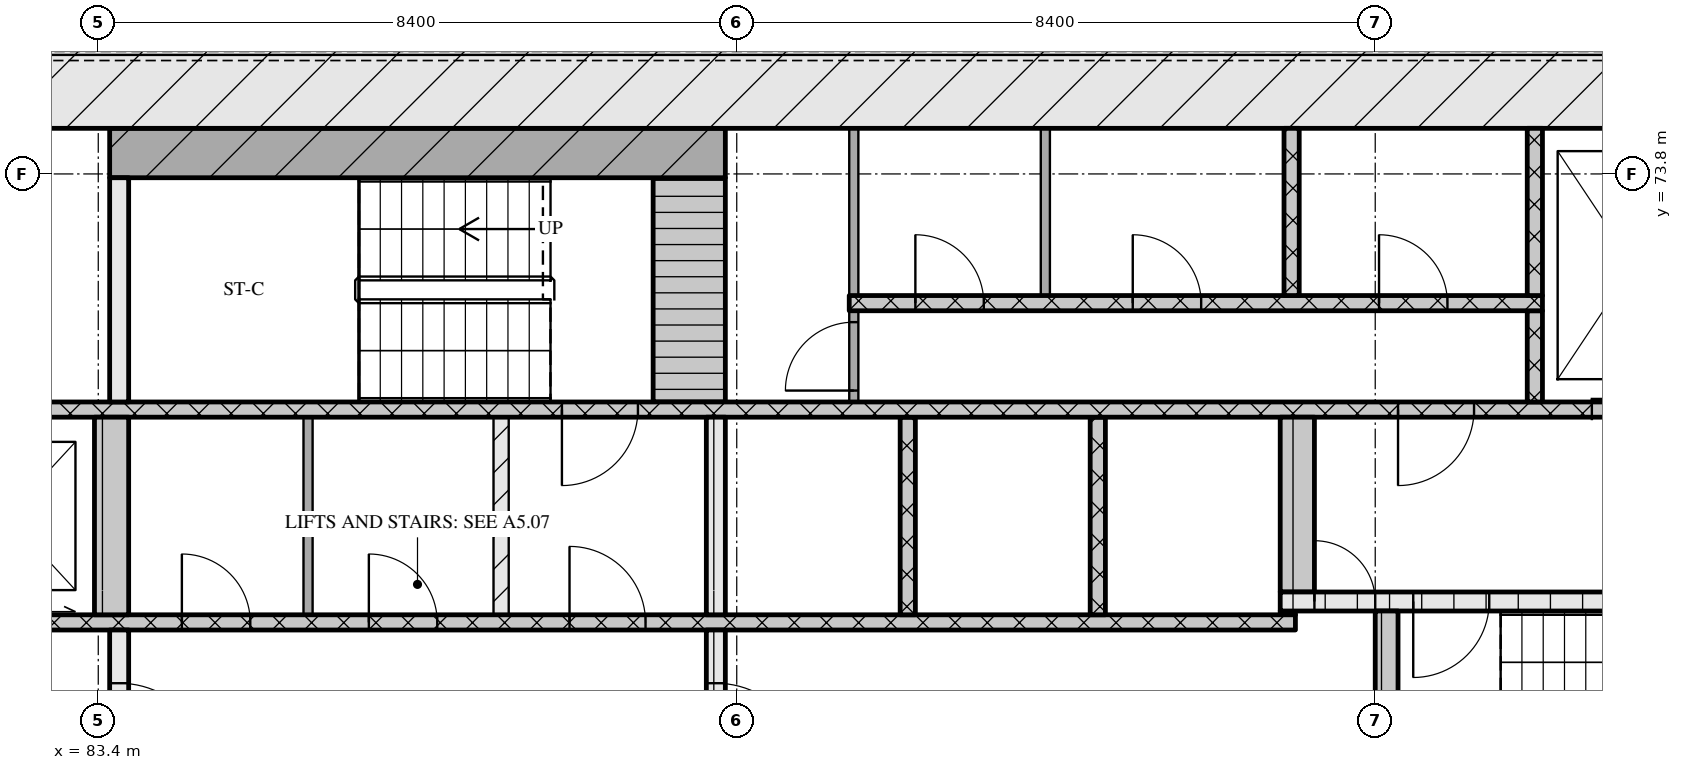
"""IFC4 building model, lengths in metres.
Left out: names, types, materials, properties, quantities, classifications, styles, units other than length and angle.
Written with IfcOpenShell. Run it as: python <this file> out.ifc"""

import sys

from ifc_helpers import new_model, si_unit, direction, frame, frame_2d, origin, place, context, subcontext, project, spatial, rectangle, extrude, element, fill, save


model = new_model("IFC4")
c1 = context("Model", 3, precision=1e-05, world=origin(), true_north=direction((0.0, 1.0)))
c2 = subcontext(c1, "Body", "Model", "MODEL_VIEW")
j1 = project(units=[si_unit("LENGTHUNIT", "METRE"), si_unit("PLANEANGLEUNIT", "RADIAN")], contexts=[c1])
p1 = place(None, origin())
s1 = spatial("IfcSite", under=j1, at=p1, CompositionType="ELEMENT")
p2 = place(p1, origin())
s2 = spatial("IfcBuilding", under=s1, at=p2, CompositionType="ELEMENT")
p3 = place(p2, frame((0.0, 0.0, 44.4)))
s3 = spatial("IfcBuildingStorey", under=s2, at=p3, CompositionType="ELEMENT", Elevation=44.4)
p4 = place(p3, frame((66.6, 75.0, 0.0), z_axis=(0.0, 0.0, 1.0), x_axis=(1.0, 0.0, 0.0)))
e1 = element("IfcWall", 1, at=p4, inside=s3, PredefinedType="SOLIDWALL", context=c2, shape_type="SweptSolid", body=[
    extrude(rectangle(XDim=42.0, YDim=1.2, at=frame_2d((21.0, 0.0))), origin(), (0.0, 0.0, 1.0), 3.32),
])
p5 = place(p3, frame((83.675, 65.2, 0.0), z_axis=(0.0, 0.0, 1.0), x_axis=(0.0, 1.0, 0.0)))
e2 = element("IfcWall", 2, at=p5, inside=s3, PredefinedType="SOLIDWALL", context=c2, shape_type="SweptSolid", body=[
    extrude(rectangle(XDim=2.6, YDim=0.25, at=frame_2d((1.3, 0.0))), origin(), (0.0, 0.0, 1.0), 3.32),
])
p6 = place(p5, frame((0.7, 0.0, 0.0)))
e3 = element("IfcOpeningElement", 3, at=p6, cuts=e2, PredefinedType="OPENING", context=c2, shape_type="SweptSolid", body=[
    extrude(rectangle(XDim=1.2, YDim=2.1, at=frame_2d((0.6, 1.05))), frame((0.0, 0.135, 0.0), z_axis=(0.0, -1.0, 0.0), x_axis=(1.0, 0.0, 0.0)), (0.0, 0.0, 1.0), 0.27),
])
p7 = place(p3, frame((91.525, 65.2, 0.0), z_axis=(0.0, 0.0, 1.0), x_axis=(0.0, 1.0, 0.0)))
e4 = element("IfcWall", 4, at=p7, inside=s3, PredefinedType="SOLIDWALL", context=c2, shape_type="SweptSolid", body=[
    extrude(rectangle(XDim=2.6, YDim=0.25, at=frame_2d((1.3, 0.0))), origin(), (0.0, 0.0, 1.0), 3.32),
])
p8 = place(p7, frame((0.7, 0.0, 0.0)))
e5 = element("IfcOpeningElement", 5, at=p8, cuts=e4, PredefinedType="OPENING", context=c2, shape_type="SweptSolid", body=[
    extrude(rectangle(XDim=1.2, YDim=2.1, at=frame_2d((0.6, 1.05))), frame((0.0, 0.135, 0.0), z_axis=(0.0, -1.0, 0.0), x_axis=(1.0, 0.0, 0.0)), (0.0, 0.0, 1.0), 0.27),
])
p9 = place(p3, frame((100.35, 65.2, 0.0), z_axis=(0.0, 0.0, 1.0), x_axis=(0.0, 1.0, 0.0)))
e6 = element("IfcWall", 6, at=p9, inside=s3, PredefinedType="SOLIDWALL", context=c2, shape_type="SweptSolid", body=[
    extrude(rectangle(XDim=2.85, YDim=0.3, at=frame_2d((1.425, 0.0))), origin(), (0.0, 0.0, 1.0), 3.32),
])
p10 = place(p3, frame((76.05, 67.9, 0.0), z_axis=(0.0, 0.0, 1.0), x_axis=(1.0, 0.0, 0.0)))
e7 = element("IfcWall", 7, at=p10, inside=s3, PredefinedType="SOLIDWALL", context=c2, shape_type="SweptSolid", body=[
    extrude(rectangle(XDim=23.1, YDim=0.2, at=frame_2d((11.55, 0.0))), origin(), (0.0, 0.0, 1.0), 3.32),
])
p11 = place(p10, frame((0.6, 0.0, 0.0)))
e8 = element("IfcOpeningElement", 8, at=p11, cuts=e7, PredefinedType="OPENING", context=c2, shape_type="SweptSolid", body=[
    extrude(rectangle(XDim=1.1, YDim=2.1, at=frame_2d((0.55, 1.05))), frame((0.0, 0.11, 0.0), z_axis=(0.0, -1.0, 0.0), x_axis=(1.0, 0.0, 0.0)), (0.0, 0.0, 1.0), 0.22),
])
p12 = place(p10, frame((3.1, 0.0, 0.0)))
e9 = element("IfcOpeningElement", 9, at=p12, cuts=e7, PredefinedType="OPENING", context=c2, shape_type="SweptSolid", body=[
    extrude(rectangle(XDim=1.1, YDim=2.1, at=frame_2d((0.55, 1.05))), frame((0.0, 0.11, 0.0), z_axis=(0.0, -1.0, 0.0), x_axis=(1.0, 0.0, 0.0)), (0.0, 0.0, 1.0), 0.22),
])
p13 = place(p10, frame((5.6, 0.0, 0.0)))
e10 = element("IfcOpeningElement", 10, at=p13, cuts=e7, PredefinedType="OPENING", context=c2, shape_type="SweptSolid", body=[
    extrude(rectangle(XDim=1.1, YDim=2.1, at=frame_2d((0.55, 1.05))), frame((0.0, 0.11, 0.0), z_axis=(0.0, -1.0, 0.0), x_axis=(1.0, 0.0, 0.0)), (0.0, 0.0, 1.0), 0.22),
])
p14 = place(p10, frame((8.45, 0.0, 0.0)))
e11 = element("IfcOpeningElement", 11, at=p14, cuts=e7, PredefinedType="OPENING", context=c2, shape_type="SweptSolid", body=[
    extrude(rectangle(XDim=0.9, YDim=2.1, at=frame_2d((0.45, 1.05))), frame((0.0, 0.11, 0.0), z_axis=(0.0, -1.0, 0.0), x_axis=(1.0, 0.0, 0.0)), (0.0, 0.0, 1.0), 0.22),
])
p15 = place(p10, frame((10.91, 0.0, 0.0)))
e12 = element("IfcOpeningElement", 12, at=p15, cuts=e7, PredefinedType="OPENING", context=c2, shape_type="SweptSolid", body=[
    extrude(rectangle(XDim=0.9, YDim=2.1, at=frame_2d((0.45, 1.05))), frame((0.0, 0.11, 0.0), z_axis=(0.0, -1.0, 0.0), x_axis=(1.0, 0.0, 0.0)), (0.0, 0.0, 1.0), 0.22),
])
p16 = place(p10, frame((13.55, 0.0, 0.0)))
e13 = element("IfcOpeningElement", 13, at=p16, cuts=e7, PredefinedType="OPENING", context=c2, shape_type="SweptSolid", body=[
    extrude(rectangle(XDim=1.0, YDim=2.1, at=frame_2d((0.5, 1.05))), frame((0.0, 0.11, 0.0), z_axis=(0.0, -1.0, 0.0), x_axis=(1.0, 0.0, 0.0)), (0.0, 0.0, 1.0), 0.22),
])
p17 = place(p3, frame((83.575, 68.0, 0.0), z_axis=(0.0, 0.0, 1.0), x_axis=(0.0, 1.0, 0.0)))
e14 = element("IfcWall", 14, at=p17, inside=s3, PredefinedType="SOLIDWALL", context=c2, shape_type="SweptSolid", body=[
    extrude(rectangle(XDim=2.6, YDim=0.45, at=frame_2d((1.3, 0.0))), origin(), (0.0, 0.0, 1.0), 3.32),
])
p18 = place(p3, frame((86.16, 68.0, 0.0), z_axis=(0.0, 0.0, 1.0), x_axis=(0.0, 1.0, 0.0)))
e15 = element("IfcWall", 15, at=p18, inside=s3, PredefinedType="PARTITIONING", context=c2, shape_type="SweptSolid", body=[
    extrude(rectangle(XDim=2.6, YDim=0.12, at=frame_2d((1.3, 0.0))), origin(), (0.0, 0.0, 1.0), 3.32),
])
p19 = place(p3, frame((88.7, 68.0, 0.0), z_axis=(0.0, 0.0, 1.0), x_axis=(0.0, 1.0, 0.0)))
e16 = element("IfcWall", 16, at=p19, inside=s3, PredefinedType="PARTITIONING", context=c2, shape_type="SweptSolid", body=[
    extrude(rectangle(XDim=2.6, YDim=0.2, at=frame_2d((1.3, 0.0))), origin(), (0.0, 0.0, 1.0), 3.32),
])
p20 = place(p3, frame((91.525, 68.0, 0.0), z_axis=(0.0, 0.0, 1.0), x_axis=(0.0, 1.0, 0.0)))
e17 = element("IfcWall", 17, at=p20, inside=s3, PredefinedType="SOLIDWALL", context=c2, shape_type="SweptSolid", body=[
    extrude(rectangle(XDim=2.6, YDim=0.25, at=frame_2d((1.3, 0.0))), origin(), (0.0, 0.0, 1.0), 3.32),
])
for number, where, z_axis, x_axis in (
    (18, (94.05, 68.0, 0.0), (0.0, 0.0, 1.0), (0.0, 1.0, 0.0)),
    (19, (96.55, 68.0, 0.0), (0.0, 0.0, 1.0), (0.0, 1.0, 0.0)),
):
    element("IfcWall", number, at=place(p3, frame(where, z_axis=z_axis, x_axis=x_axis)), inside=s3, PredefinedType="SOLIDWALL", context=c2, shape_type="SweptSolid", body=[
        extrude(rectangle(XDim=2.6, YDim=0.2, at=frame_2d((1.3, 0.0))), origin(), (0.0, 0.0, 1.0), 3.32),
    ])
p21 = place(p3, frame((98.95, 68.025, 0.0), z_axis=(0.0, 0.0, 1.0), x_axis=(1.0, 0.0, 0.0)))
e20 = element("IfcWall", 20, at=p21, inside=s3, PredefinedType="SOLIDWALL", context=c2, shape_type="SweptSolid", body=[
    extrude(rectangle(XDim=0.2, YDim=0.05, at=frame_2d((0.1, 0.0))), origin(), (0.0, 0.0, 1.0), 3.32),
])
p22 = place(p3, frame((98.95, 68.175, 0.0), z_axis=(0.0, 0.0, 1.0), x_axis=(1.0, 0.0, 0.0)))
e21 = element("IfcWall", 21, at=p22, inside=s3, PredefinedType="SOLIDWALL", context=c2, shape_type="SweptSolid", body=[
    extrude(rectangle(XDim=8.45, YDim=0.25, at=frame_2d((4.225, 0.0))), origin(), (0.0, 0.0, 1.0), 3.32),
])
p23 = place(p22, frame((0.45, 0.0, 0.0)))
e22 = element("IfcOpeningElement", 22, at=p23, cuts=e21, PredefinedType="OPENING", context=c2, shape_type="SweptSolid", body=[
    extrude(rectangle(XDim=0.8, YDim=2.1, at=frame_2d((0.4, 1.05))), frame((0.0, 0.135, 0.0), z_axis=(0.0, -1.0, 0.0), x_axis=(1.0, 0.0, 0.0)), (0.0, 0.0, 1.0), 0.27),
])
p24 = place(p22, frame((1.75, 0.0, 0.0)))
e23 = element("IfcOpeningElement", 23, at=p24, cuts=e21, PredefinedType="OPENING", context=c2, shape_type="SweptSolid", body=[
    extrude(rectangle(XDim=1.0, YDim=2.1, at=frame_2d((0.5, 1.05))), frame((0.0, 0.135, 0.0), z_axis=(0.0, -1.0, 0.0), x_axis=(1.0, 0.0, 0.0)), (0.0, 0.0, 1.0), 0.27),
])
p25 = place(p3, frame((99.175, 68.3, 0.0), z_axis=(0.0, 0.0, 1.0), x_axis=(0.0, 1.0, 0.0)))
e24 = element("IfcWall", 24, at=p25, inside=s3, PredefinedType="SOLIDWALL", context=c2, shape_type="SweptSolid", body=[
    extrude(rectangle(XDim=2.3, YDim=0.45, at=frame_2d((1.15, 0.0))), origin(), (0.0, 0.0, 1.0), 3.32),
])
p26 = place(p3, frame((67.8, 70.7, 0.0), z_axis=(0.0, 0.0, 1.0), x_axis=(1.0, 0.0, 0.0)))
e25 = element("IfcWall", 25, at=p26, inside=s3, PredefinedType="SOLIDWALL", context=c2, shape_type="SweptSolid", body=[
    extrude(rectangle(XDim=39.6, YDim=0.2, at=frame_2d((19.8, 0.0))), origin(), (0.0, 0.0, 1.0), 3.32),
])
p27 = place(p26, frame((0.65, 0.0, 0.0)))
e26 = element("IfcOpeningElement", 26, at=p27, cuts=e25, PredefinedType="OPENING", context=c2, shape_type="SweptSolid", body=[
    extrude(rectangle(XDim=1.1, YDim=2.1, at=frame_2d((0.55, 1.05))), frame((0.0, 0.11, 0.0), z_axis=(0.0, -1.0, 0.0), x_axis=(1.0, 0.0, 0.0)), (0.0, 0.0, 1.0), 0.22),
])
p28 = place(p26, frame((3.25, 0.0, 0.0)))
e27 = element("IfcOpeningElement", 27, at=p28, cuts=e25, PredefinedType="OPENING", context=c2, shape_type="SweptSolid", body=[
    extrude(rectangle(XDim=1.1, YDim=2.1, at=frame_2d((0.55, 1.05))), frame((0.0, 0.11, 0.0), z_axis=(0.0, -1.0, 0.0), x_axis=(1.0, 0.0, 0.0)), (0.0, 0.0, 1.0), 0.22),
])
p29 = place(p26, frame((5.9, 0.0, 0.0)))
e28 = element("IfcOpeningElement", 28, at=p29, cuts=e25, PredefinedType="OPENING", context=c2, shape_type="SweptSolid", body=[
    extrude(rectangle(XDim=1.0, YDim=2.1, at=frame_2d((0.5, 1.05))), frame((0.0, 0.11, 0.0), z_axis=(0.0, -1.0, 0.0), x_axis=(1.0, 0.0, 0.0)), (0.0, 0.0, 1.0), 0.22),
])
p30 = place(p26, frame((21.7, 0.0, 0.0)))
e29 = element("IfcOpeningElement", 29, at=p30, cuts=e25, PredefinedType="OPENING", context=c2, shape_type="SweptSolid", body=[
    extrude(rectangle(XDim=1.0, YDim=2.1, at=frame_2d((0.5, 1.05))), frame((0.0, 0.11, 0.0), z_axis=(0.0, -1.0, 0.0), x_axis=(1.0, 0.0, 0.0)), (0.0, 0.0, 1.0), 0.22),
])
p31 = place(p26, frame((32.7, 0.0, 0.0)))
e30 = element("IfcOpeningElement", 30, at=p31, cuts=e25, PredefinedType="OPENING", context=c2, shape_type="SweptSolid", body=[
    extrude(rectangle(XDim=1.0, YDim=2.1, at=frame_2d((0.5, 1.05))), frame((0.0, 0.11, 0.0), z_axis=(0.0, -1.0, 0.0), x_axis=(1.0, 0.0, 0.0)), (0.0, 0.0, 1.0), 0.22),
])
p32 = place(p26, frame((35.25, 0.0, 0.0)))
e31 = element("IfcOpeningElement", 31, at=p32, cuts=e25, PredefinedType="OPENING", context=c2, shape_type="SweptSolid", body=[
    extrude(rectangle(XDim=1.1, YDim=2.1, at=frame_2d((0.55, 1.05))), frame((0.0, 0.11, 0.0), z_axis=(0.0, -1.0, 0.0), x_axis=(1.0, 0.0, 0.0)), (0.0, 0.0, 1.0), 0.22),
])
p33 = place(p26, frame((37.85, 0.0, 0.0)))
e32 = element("IfcOpeningElement", 32, at=p33, cuts=e25, PredefinedType="OPENING", context=c2, shape_type="SweptSolid", body=[
    extrude(rectangle(XDim=1.1, YDim=2.1, at=frame_2d((0.55, 1.05))), frame((0.0, 0.11, 0.0), z_axis=(0.0, -1.0, 0.0), x_axis=(1.0, 0.0, 0.0)), (0.0, 0.0, 1.0), 0.22),
])
p34 = place(p3, frame((83.675, 70.8, 0.0), z_axis=(0.0, 0.0, 1.0), x_axis=(0.0, 1.0, 0.0)))
e33 = element("IfcWall", 33, at=p34, inside=s3, PredefinedType="SOLIDWALL", context=c2, shape_type="SweptSolid", body=[
    extrude(rectangle(XDim=2.95, YDim=0.25, at=frame_2d((1.475, 0.0))), origin(), (0.0, 0.0, 1.0), 3.32),
])
p35 = place(p3, frame((91.175, 70.8, 0.0), z_axis=(0.0, 0.0, 1.0), x_axis=(0.0, 1.0, 0.0)))
e34 = element("IfcWall", 34, at=p35, inside=s3, PredefinedType="SOLIDWALL", context=c2, shape_type="SweptSolid", body=[
    extrude(rectangle(XDim=2.95, YDim=0.95, at=frame_2d((1.475, 0.0))), origin(), (0.0, 0.0, 1.0), 3.32),
])
p36 = place(p3, frame((93.34, 70.8, 0.0), z_axis=(0.0, 0.0, 1.0), x_axis=(0.0, 1.0, 0.0)))
e35 = element("IfcWall", 35, at=p36, inside=s3, PredefinedType="PARTITIONING", context=c2, shape_type="SweptSolid", body=[
    extrude(rectangle(XDim=1.2, YDim=0.12, at=frame_2d((0.6, 0.0))), origin(), (0.0, 0.0, 1.0), 3.32),
])
p37 = place(p36, frame((0.15, 0.0, 0.0)))
e36 = element("IfcOpeningElement", 36, at=p37, cuts=e35, PredefinedType="OPENING", context=c2, shape_type="SweptSolid", body=[
    extrude(rectangle(XDim=0.9, YDim=2.1, at=frame_2d((0.45, 1.05))), frame((0.0, 0.07, 0.0), z_axis=(0.0, -1.0, 0.0), x_axis=(1.0, 0.0, 0.0)), (0.0, 0.0, 1.0), 0.14),
])
p38 = place(p3, frame((102.3, 70.8, 0.0), z_axis=(0.0, 0.0, 1.0), x_axis=(0.0, 1.0, 0.0)))
e37 = element("IfcWall", 37, at=p38, inside=s3, PredefinedType="SOLIDWALL", context=c2, shape_type="SweptSolid", body=[
    extrude(rectangle(XDim=1.2, YDim=0.2, at=frame_2d((0.6, 0.0))), origin(), (0.0, 0.0, 1.0), 3.32),
])
p39 = place(p3, frame((93.28, 72.1, 0.0), z_axis=(0.0, 0.0, 1.0), x_axis=(1.0, 0.0, 0.0)))
e38 = element("IfcWall", 38, at=p39, inside=s3, PredefinedType="SOLIDWALL", context=c2, shape_type="SweptSolid", body=[
    extrude(rectangle(XDim=9.12, YDim=0.2, at=frame_2d((4.56, 0.0))), origin(), (0.0, 0.0, 1.0), 3.32),
])
p40 = place(p39, frame((0.87, 0.0, 0.0)))
e39 = element("IfcOpeningElement", 39, at=p40, cuts=e38, PredefinedType="OPENING", context=c2, shape_type="SweptSolid", body=[
    extrude(rectangle(XDim=0.9, YDim=2.1, at=frame_2d((0.45, 1.05))), frame((0.0, 0.11, 0.0), z_axis=(0.0, -1.0, 0.0), x_axis=(1.0, 0.0, 0.0)), (0.0, 0.0, 1.0), 0.22),
])
p41 = place(p39, frame((3.73, 0.0, 0.0)))
e40 = element("IfcOpeningElement", 40, at=p41, cuts=e38, PredefinedType="OPENING", context=c2, shape_type="SweptSolid", body=[
    extrude(rectangle(XDim=0.9, YDim=2.1, at=frame_2d((0.45, 1.05))), frame((0.0, 0.11, 0.0), z_axis=(0.0, -1.0, 0.0), x_axis=(1.0, 0.0, 0.0)), (0.0, 0.0, 1.0), 0.22),
])
p42 = place(p39, frame((6.97, 0.0, 0.0)))
e41 = element("IfcOpeningElement", 41, at=p42, cuts=e38, PredefinedType="OPENING", context=c2, shape_type="SweptSolid", body=[
    extrude(rectangle(XDim=0.9, YDim=2.1, at=frame_2d((0.45, 1.05))), frame((0.0, 0.11, 0.0), z_axis=(0.0, -1.0, 0.0), x_axis=(1.0, 0.0, 0.0)), (0.0, 0.0, 1.0), 0.22),
])
for number, where, z_axis, x_axis in (
    (42, (93.34, 72.2, 0.0), (0.0, 0.0, 1.0), (0.0, 1.0, 0.0)),
    (43, (95.86, 72.2, 0.0), (0.0, 0.0, 1.0), (0.0, 1.0, 0.0)),
):
    element("IfcWall", number, at=place(p3, frame(where, z_axis=z_axis, x_axis=x_axis)), inside=s3, PredefinedType="PARTITIONING", context=c2, shape_type="SweptSolid", body=[
        extrude(rectangle(XDim=2.2, YDim=0.12, at=frame_2d((1.1, 0.0))), origin(), (0.0, 0.0, 1.0), 3.32),
    ])
for number, where, z_axis, x_axis in (
    (44, (99.1, 72.2, 0.0), (0.0, 0.0, 1.0), (0.0, 1.0, 0.0)),
    (45, (102.3, 72.2, 0.0), (0.0, 0.0, 1.0), (0.0, 1.0, 0.0)),
):
    element("IfcWall", number, at=place(p3, frame(where, z_axis=z_axis, x_axis=x_axis)), inside=s3, PredefinedType="SOLIDWALL", context=c2, shape_type="SweptSolid", body=[
        extrude(rectangle(XDim=2.2, YDim=0.2, at=frame_2d((1.1, 0.0))), origin(), (0.0, 0.0, 1.0), 3.32),
    ])
p43 = place(p3, frame((83.55, 74.075, 0.0), z_axis=(0.0, 0.0, 1.0), x_axis=(1.0, 0.0, 0.0)))
e46 = element("IfcWall", 46, at=p43, inside=s3, PredefinedType="SOLIDWALL", context=c2, shape_type="SweptSolid", body=[
    extrude(rectangle(XDim=8.1, YDim=0.65, at=frame_2d((4.05, 0.0))), origin(), (0.0, 0.0, 1.0), 3.32),
])
p44 = place(p6, origin())
e47 = element("IfcDoor", 47, at=p44, inside=s3, OperationType="SINGLE_SWING_RIGHT", PredefinedType="DOOR", context=c2, shape_type="SweptSolid", body=[
    extrude(rectangle(XDim=1.2, YDim=2.1, at=frame_2d((0.6, 1.05))), frame((0.0, 0.025, 0.0), z_axis=(0.0, -1.0, 0.0), x_axis=(1.0, 0.0, 0.0)), (0.0, 0.0, 1.0), 0.05),
])
fill(e3, e47)
p45 = place(p8, origin())
e48 = element("IfcDoor", 48, at=p45, inside=s3, OperationType="SINGLE_SWING_RIGHT", PredefinedType="DOOR", context=c2, shape_type="SweptSolid", body=[
    extrude(rectangle(XDim=1.2, YDim=2.1, at=frame_2d((0.6, 1.05))), frame((0.0, 0.025, 0.0), z_axis=(0.0, -1.0, 0.0), x_axis=(1.0, 0.0, 0.0)), (0.0, 0.0, 1.0), 0.05),
])
fill(e5, e48)
p46 = place(p14, origin())
e49 = element("IfcDoor", 49, at=p46, inside=s3, OperationType="SINGLE_SWING_LEFT", PredefinedType="DOOR", context=c2, shape_type="SweptSolid", body=[
    extrude(rectangle(XDim=0.9, YDim=2.1, at=frame_2d((0.45, 1.05))), frame((0.0, 0.025, 0.0), z_axis=(0.0, -1.0, 0.0), x_axis=(1.0, 0.0, 0.0)), (0.0, 0.0, 1.0), 0.05),
])
fill(e11, e49)
p47 = place(p15, origin())
e50 = element("IfcDoor", 50, at=p47, inside=s3, OperationType="SINGLE_SWING_LEFT", PredefinedType="DOOR", context=c2, shape_type="SweptSolid", body=[
    extrude(rectangle(XDim=0.9, YDim=2.1, at=frame_2d((0.45, 1.05))), frame((0.0, 0.025, 0.0), z_axis=(0.0, -1.0, 0.0), x_axis=(1.0, 0.0, 0.0)), (0.0, 0.0, 1.0), 0.05),
])
fill(e12, e50)
p48 = place(p16, origin())
e51 = element("IfcDoor", 51, at=p48, inside=s3, OperationType="SINGLE_SWING_LEFT", PredefinedType="DOOR", context=c2, shape_type="SweptSolid", body=[
    extrude(rectangle(XDim=1.0, YDim=2.1, at=frame_2d((0.5, 1.05))), frame((0.0, 0.025, 0.0), z_axis=(0.0, -1.0, 0.0), x_axis=(1.0, 0.0, 0.0)), (0.0, 0.0, 1.0), 0.05),
])
fill(e13, e51)
p49 = place(p23, origin())
e52 = element("IfcDoor", 52, at=p49, inside=s3, OperationType="SINGLE_SWING_LEFT", PredefinedType="DOOR", context=c2, shape_type="SweptSolid", body=[
    extrude(rectangle(XDim=0.8, YDim=2.1, at=frame_2d((0.4, 1.05))), frame((0.0, 0.025, 0.0), z_axis=(0.0, -1.0, 0.0), x_axis=(1.0, 0.0, 0.0)), (0.0, 0.0, 1.0), 0.05),
])
fill(e22, e52)
p50 = place(p24, origin())
e53 = element("IfcDoor", 53, at=p50, inside=s3, OperationType="SINGLE_SWING_RIGHT", PredefinedType="DOOR", context=c2, shape_type="SweptSolid", body=[
    extrude(rectangle(XDim=1.0, YDim=2.1, at=frame_2d((0.5, 1.05))), frame((0.0, 0.025, 0.0), z_axis=(0.0, -1.0, 0.0), x_axis=(1.0, 0.0, 0.0)), (0.0, 0.0, 1.0), 0.05),
])
fill(e23, e53)
p51 = place(p30, origin())
e54 = element("IfcDoor", 54, at=p51, inside=s3, OperationType="SINGLE_SWING_RIGHT", PredefinedType="DOOR", context=c2, shape_type="SweptSolid", body=[
    extrude(rectangle(XDim=1.0, YDim=2.1, at=frame_2d((0.5, 1.05))), frame((0.0, 0.025, 0.0), z_axis=(0.0, -1.0, 0.0), x_axis=(1.0, 0.0, 0.0)), (0.0, 0.0, 1.0), 0.05),
])
fill(e29, e54)
p52 = place(p31, origin())
e55 = element("IfcDoor", 55, at=p52, inside=s3, OperationType="SINGLE_SWING_RIGHT", PredefinedType="DOOR", context=c2, shape_type="SweptSolid", body=[
    extrude(rectangle(XDim=1.0, YDim=2.1, at=frame_2d((0.5, 1.05))), frame((0.0, 0.025, 0.0), z_axis=(0.0, -1.0, 0.0), x_axis=(1.0, 0.0, 0.0)), (0.0, 0.0, 1.0), 0.05),
])
fill(e30, e55)
p53 = place(p32, origin())
e56 = element("IfcDoor", 56, at=p53, inside=s3, OperationType="SLIDING_TO_RIGHT", PredefinedType="DOOR", context=c2, shape_type="SweptSolid", body=[
    extrude(rectangle(XDim=1.1, YDim=2.1, at=frame_2d((0.55, 1.05))), frame((0.0, 0.025, 0.0), z_axis=(0.0, -1.0, 0.0), x_axis=(1.0, 0.0, 0.0)), (0.0, 0.0, 1.0), 0.05),
])
fill(e31, e56)
p54 = place(p37, origin())
e57 = element("IfcDoor", 57, at=p54, inside=s3, OperationType="SINGLE_SWING_LEFT", PredefinedType="DOOR", context=c2, shape_type="SweptSolid", body=[
    extrude(rectangle(XDim=0.9, YDim=2.1, at=frame_2d((0.45, 1.05))), frame((0.0, 0.025, 0.0), z_axis=(0.0, -1.0, 0.0), x_axis=(1.0, 0.0, 0.0)), (0.0, 0.0, 1.0), 0.05),
])
fill(e36, e57)
p55 = place(p40, origin())
e58 = element("IfcDoor", 58, at=p55, inside=s3, OperationType="SINGLE_SWING_LEFT", PredefinedType="DOOR", context=c2, shape_type="SweptSolid", body=[
    extrude(rectangle(XDim=0.9, YDim=2.1, at=frame_2d((0.45, 1.05))), frame((0.0, 0.025, 0.0), z_axis=(0.0, -1.0, 0.0), x_axis=(1.0, 0.0, 0.0)), (0.0, 0.0, 1.0), 0.05),
])
fill(e39, e58)
p56 = place(p41, origin())
e59 = element("IfcDoor", 59, at=p56, inside=s3, OperationType="SINGLE_SWING_LEFT", PredefinedType="DOOR", context=c2, shape_type="SweptSolid", body=[
    extrude(rectangle(XDim=0.9, YDim=2.1, at=frame_2d((0.45, 1.05))), frame((0.0, 0.025, 0.0), z_axis=(0.0, -1.0, 0.0), x_axis=(1.0, 0.0, 0.0)), (0.0, 0.0, 1.0), 0.05),
])
fill(e40, e59)
p57 = place(p42, origin())
e60 = element("IfcDoor", 60, at=p57, inside=s3, OperationType="SINGLE_SWING_LEFT", PredefinedType="DOOR", context=c2, shape_type="SweptSolid", body=[
    extrude(rectangle(XDim=0.9, YDim=2.1, at=frame_2d((0.45, 1.05))), frame((0.0, 0.025, 0.0), z_axis=(0.0, -1.0, 0.0), x_axis=(1.0, 0.0, 0.0)), (0.0, 0.0, 1.0), 0.05),
])
fill(e41, e60)
save(model, sys.argv[1])
